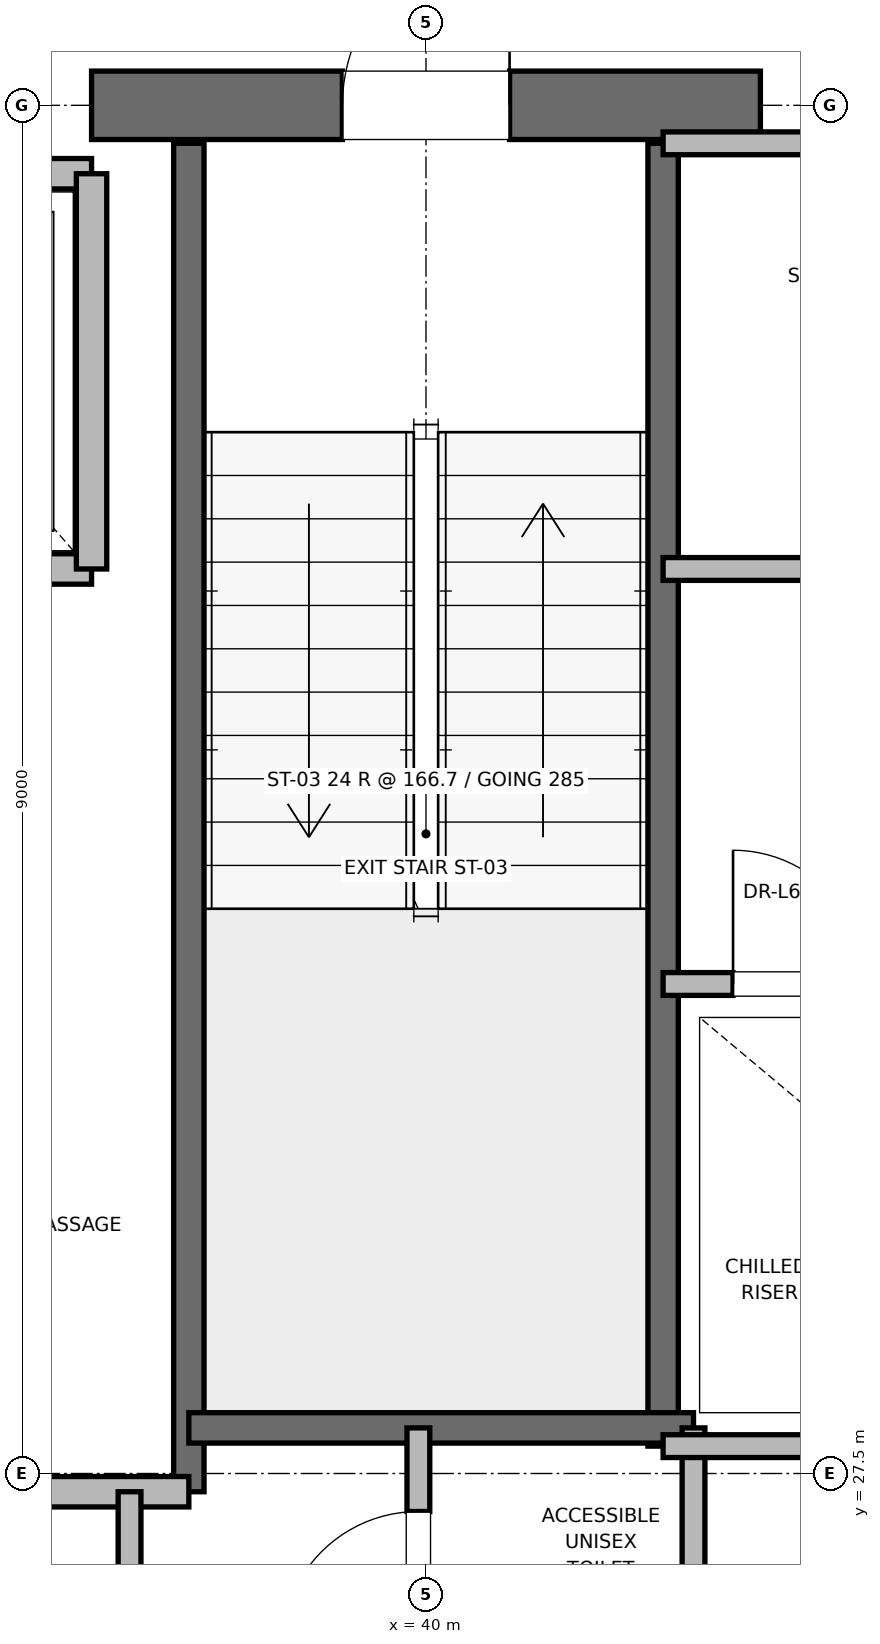
"""IFC4 building model, lengths in metres.
Left out: names, types, materials, properties, quantities, classifications, styles, units other than length and angle.
Written with IfcOpenShell. Run it as: python <this file> out.ifc"""

import sys

from ifc_helpers import new_model, si_unit, direction, frame, frame_2d, origin, place, context, subcontext, project, spatial, rectangle, extrude, element, fill, save


model = new_model("IFC4")
c1 = context("Model", 3, precision=1e-05, world=origin(), true_north=direction((0.0, 1.0)))
c2 = subcontext(c1, "Body", "Model", "MODEL_VIEW")
j1 = project(units=[si_unit("LENGTHUNIT", "METRE"), si_unit("PLANEANGLEUNIT", "RADIAN")], contexts=[c1])
p1 = place(None, origin())
s1 = spatial("IfcSite", under=j1, at=p1, CompositionType="ELEMENT")
p2 = place(p1, origin())
s2 = spatial("IfcBuilding", under=s1, at=p2, CompositionType="ELEMENT")
p3 = place(p2, frame((0.0, 0.0, 267.2)))
s3 = spatial("IfcBuildingStorey", under=s2, at=p3, CompositionType="ELEMENT", Elevation=267.2)
p4 = place(p3, frame((37.8, 36.5, 0.0), z_axis=(0.0, 0.0, 1.0), x_axis=(1.0, 0.0, 0.0)))
e1 = element("IfcWall", 1, at=p4, inside=s3, PredefinedType="SHEAR", context=c2, shape_type="SweptSolid", body=[
    extrude(rectangle(XDim=4.4, YDim=0.45, at=frame_2d((2.2, 0.0))), origin(), (0.0, 0.0, 1.0), 3.785),
])
p5 = place(p4, frame((1.65, 0.0, 0.0)))
e2 = element("IfcOpeningElement", 2, at=p5, cuts=e1, PredefinedType="OPENING", context=c2, shape_type="SweptSolid", body=[
    extrude(rectangle(XDim=1.1, YDim=2.15, at=frame_2d((0.55, 1.075))), frame((0.0, 0.225, 0.0), z_axis=(0.0, -1.0, 0.0), x_axis=(1.0, 0.0, 0.0)), (0.0, 0.0, 1.0), 0.45),
])
p6 = place(p3, frame((38.44, 27.38, 0.0), z_axis=(0.0, 0.0, 1.0), x_axis=(0.0, 1.0, 0.0)))
e3 = element("IfcWall", 3, at=p6, inside=s3, PredefinedType="SOLIDWALL", context=c2, shape_type="SweptSolid", body=[
    extrude(rectangle(XDim=8.87, YDim=0.2, at=frame_2d((4.435, 0.0))), origin(), (0.0, 0.0, 1.0), 3.785),
])
p7 = place(p3, frame((41.56, 27.68, 0.0), z_axis=(0.0, 0.0, 1.0), x_axis=(0.0, 1.0, 0.0)))
e4 = element("IfcWall", 4, at=p7, inside=s3, PredefinedType="SOLIDWALL", context=c2, shape_type="SweptSolid", body=[
    extrude(rectangle(XDim=8.57, YDim=0.2, at=frame_2d((4.285, 0.0))), origin(), (0.0, 0.0, 1.0), 3.785),
])
p8 = place(p3, frame((38.44, 27.8, 0.0), z_axis=(0.0, 0.0, 1.0), x_axis=(1.0, 0.0, 0.0)))
e5 = element("IfcWall", 5, at=p8, inside=s3, PredefinedType="SOLIDWALL", context=c2, shape_type="SweptSolid", body=[
    extrude(rectangle(XDim=3.32, YDim=0.2, at=frame_2d((1.66, 0.0))), origin(), (0.0, 0.0, 1.0), 3.785),
])
p9 = place(p3, frame((32.82, 27.38, 0.0), z_axis=(0.0, 0.0, 1.0), x_axis=(1.0, 0.0, 0.0)))
e6 = element("IfcWall", 6, at=p9, inside=s3, PredefinedType="PARTITIONING", context=c2, shape_type="SweptSolid", body=[
    extrude(rectangle(XDim=5.62, YDim=0.2, at=frame_2d((2.81, 0.0))), origin(), (0.0, 0.0, 1.0), 3.785),
])
p10 = place(p3, frame((35.5, 33.45, 0.0), z_axis=(0.0, 0.0, 1.0), x_axis=(1.0, 0.0, 0.0)))
e7 = element("IfcWall", 7, at=p10, inside=s3, PredefinedType="SOLIDWALL", context=c2, shape_type="SweptSolid", body=[
    extrude(rectangle(XDim=2.3, YDim=0.2, at=frame_2d((1.15, 0.0))), origin(), (0.0, 0.0, 1.0), 3.785),
])
p11 = place(p10, frame((0.6, 0.0, 0.0)))
e8 = element("IfcOpeningElement", 8, at=p11, cuts=e7, PredefinedType="OPENING", context=c2, shape_type="SweptSolid", body=[
    extrude(rectangle(XDim=1.1, YDim=2.2, at=frame_2d((0.55, 1.1))), frame((0.0, 0.1, 0.0), z_axis=(0.0, -1.0, 0.0), x_axis=(1.0, 0.0, 0.0)), (0.0, 0.0, 1.0), 0.2),
])
p12 = place(p3, frame((37.8, 36.05, 0.0), z_axis=(0.0, 0.0, 1.0), x_axis=(-1.0, 0.0, 0.0)))
e9 = element("IfcWall", 9, at=p12, inside=s3, PredefinedType="SOLIDWALL", context=c2, shape_type="SweptSolid", body=[
    extrude(rectangle(XDim=2.3, YDim=0.2, at=frame_2d((1.15, 0.0))), origin(), (0.0, 0.0, 1.0), 2.865),
])
p13 = place(p3, frame((37.8, 33.45, 0.0), z_axis=(0.0, 0.0, 1.0), x_axis=(0.0, 1.0, 0.0)))
e10 = element("IfcWall", 10, at=p13, inside=s3, PredefinedType="SOLIDWALL", context=c2, shape_type="SweptSolid", body=[
    extrude(rectangle(XDim=2.6, YDim=0.2, at=frame_2d((1.3, 0.0))), origin(), (0.0, 0.0, 1.0), 2.865),
])
p14 = place(p3, frame((41.76, 23.8, 0.0), z_axis=(0.0, 0.0, 1.0), x_axis=(0.0, 1.0, 0.0)))
e11 = element("IfcWall", 11, at=p14, inside=s3, PredefinedType="PARTITIONING", context=c2, shape_type="SweptSolid", body=[
    extrude(rectangle(XDim=4.0, YDim=0.15, at=frame_2d((2.0, 0.0))), origin(), (0.0, 0.0, 1.0), 2.85),
])
p15 = place(p3, frame((39.95, 25.8, 0.0), z_axis=(0.0, 0.0, 1.0), x_axis=(0.0, 1.0, 0.0)))
e12 = element("IfcWall", 12, at=p15, inside=s3, PredefinedType="PARTITIONING", context=c2, shape_type="SweptSolid", body=[
    extrude(rectangle(XDim=2.0, YDim=0.15, at=frame_2d((1.0, 0.0))), origin(), (0.0, 0.0, 1.0), 2.85),
])
p16 = place(p15, frame((0.55, 0.0, 0.0)))
e13 = element("IfcOpeningElement", 13, at=p16, cuts=e12, PredefinedType="OPENING", context=c2, shape_type="SweptSolid", body=[
    extrude(rectangle(XDim=0.9, YDim=2.1, at=frame_2d((0.45, 1.05))), frame((0.0, 0.075, 0.0), z_axis=(0.0, -1.0, 0.0), x_axis=(1.0, 0.0, 0.0)), (0.0, 0.0, 1.0), 0.15),
])
p17 = place(p3, frame((38.05, 23.06, 0.0), z_axis=(0.0, 0.0, 1.0), x_axis=(0.0, 1.0, 0.0)))
e14 = element("IfcWall", 14, at=p17, inside=s3, PredefinedType="PARTITIONING", context=c2, shape_type="SweptSolid", body=[
    extrude(rectangle(XDim=4.32, YDim=0.15, at=frame_2d((2.16, 0.0))), origin(), (0.0, 0.0, 1.0), 2.85),
])
p18 = place(p17, frame((1.66, 0.0, 0.0)))
e15 = element("IfcOpeningElement", 15, at=p18, cuts=e14, PredefinedType="OPENING", context=c2, shape_type="SweptSolid", body=[
    extrude(rectangle(XDim=1.0, YDim=2.15, at=frame_2d((0.5, 1.075))), frame((0.0, 0.075, 0.0), z_axis=(0.0, -1.0, 0.0), x_axis=(1.0, 0.0, 0.0)), (0.0, 0.0, 1.0), 0.15),
])
p19 = place(p3, frame((41.56, 27.68, 0.0), z_axis=(0.0, 0.0, 1.0), x_axis=(1.0, 0.0, 0.0)))
e16 = element("IfcWall", 16, at=p19, inside=s3, PredefinedType="PARTITIONING", context=c2, shape_type="SweptSolid", body=[
    extrude(rectangle(XDim=3.59, YDim=0.15, at=frame_2d((1.795, 0.0))), origin(), (0.0, 0.0, 1.0), 2.85),
])
p20 = place(p3, frame((41.56, 30.72, 0.0), z_axis=(0.0, 0.0, 1.0), x_axis=(1.0, 0.0, 0.0)))
e17 = element("IfcWall", 17, at=p20, inside=s3, PredefinedType="PARTITIONING", context=c2, shape_type="SweptSolid", body=[
    extrude(rectangle(XDim=1.8, YDim=0.15, at=frame_2d((0.9, 0.0))), origin(), (0.0, 0.0, 1.0), 2.85),
])
p21 = place(p20, frame((0.46, 0.0, 0.0)))
e18 = element("IfcOpeningElement", 18, at=p21, cuts=e17, PredefinedType="OPENING", context=c2, shape_type="SweptSolid", body=[
    extrude(rectangle(XDim=0.88, YDim=2.1, at=frame_2d((0.44, 1.05))), frame((0.0, 0.075, 0.0), z_axis=(0.0, -1.0, 0.0), x_axis=(1.0, 0.0, 0.0)), (0.0, 0.0, 1.0), 0.15),
])
p22 = place(p3, frame((41.56, 36.25, 0.0), z_axis=(0.0, 0.0, 1.0), x_axis=(1.0, 0.0, 0.0)))
e19 = element("IfcWall", 19, at=p22, inside=s3, PredefinedType="PARTITIONING", context=c2, shape_type="SweptSolid", body=[
    extrude(rectangle(XDim=2.94, YDim=0.15, at=frame_2d((1.47, 0.0))), origin(), (0.0, 0.0, 1.0), 2.85),
])
p23 = place(p3, frame((41.56, 33.45, 0.0), z_axis=(0.0, 0.0, 1.0), x_axis=(1.0, 0.0, 0.0)))
e20 = element("IfcWall", 20, at=p23, inside=s3, PredefinedType="PARTITIONING", context=c2, shape_type="SweptSolid", body=[
    extrude(rectangle(XDim=2.94, YDim=0.15, at=frame_2d((1.47, 0.0))), origin(), (0.0, 0.0, 1.0), 2.85),
])
p24 = place(p23, frame((1.03, 0.0, 0.0)))
e21 = element("IfcOpeningElement", 21, at=p24, cuts=e20, PredefinedType="OPENING", context=c2, shape_type="SweptSolid", body=[
    extrude(rectangle(XDim=0.88, YDim=2.1, at=frame_2d((0.44, 1.05))), frame((0.0, 0.075, 0.0), z_axis=(0.0, -1.0, 0.0), x_axis=(1.0, 0.0, 0.0)), (0.0, 0.0, 1.0), 0.15),
])
p25 = place(p5, origin())
e22 = element("IfcDoor", 22, at=p25, inside=s3, OperationType="SINGLE_SWING_RIGHT", PredefinedType="DOOR", context=c2, shape_type="SweptSolid", body=[
    extrude(rectangle(XDim=1.1, YDim=2.15, at=frame_2d((0.55, 1.075))), frame((0.0, 0.025, 0.0), z_axis=(0.0, -1.0, 0.0), x_axis=(1.0, 0.0, 0.0)), (0.0, 0.0, 1.0), 0.05),
])
fill(e2, e22)
p26 = place(p16, origin())
e23 = element("IfcDoor", 23, at=p26, inside=s3, OperationType="SINGLE_SWING_LEFT", PredefinedType="DOOR", context=c2, shape_type="SweptSolid", body=[
    extrude(rectangle(XDim=0.9, YDim=2.1, at=frame_2d((0.45, 1.05))), frame((0.0, 0.025, 0.0), z_axis=(0.0, -1.0, 0.0), x_axis=(1.0, 0.0, 0.0)), (0.0, 0.0, 1.0), 0.05),
])
fill(e13, e23)
p27 = place(p21, origin())
e24 = element("IfcDoor", 24, at=p27, inside=s3, OperationType="SINGLE_SWING_LEFT", PredefinedType="DOOR", context=c2, shape_type="SweptSolid", body=[
    extrude(rectangle(XDim=0.88, YDim=2.1, at=frame_2d((0.44, 1.05))), frame((0.0, 0.025, 0.0), z_axis=(0.0, -1.0, 0.0), x_axis=(1.0, 0.0, 0.0)), (0.0, 0.0, 1.0), 0.05),
])
fill(e18, e24)
save(model, sys.argv[1])
